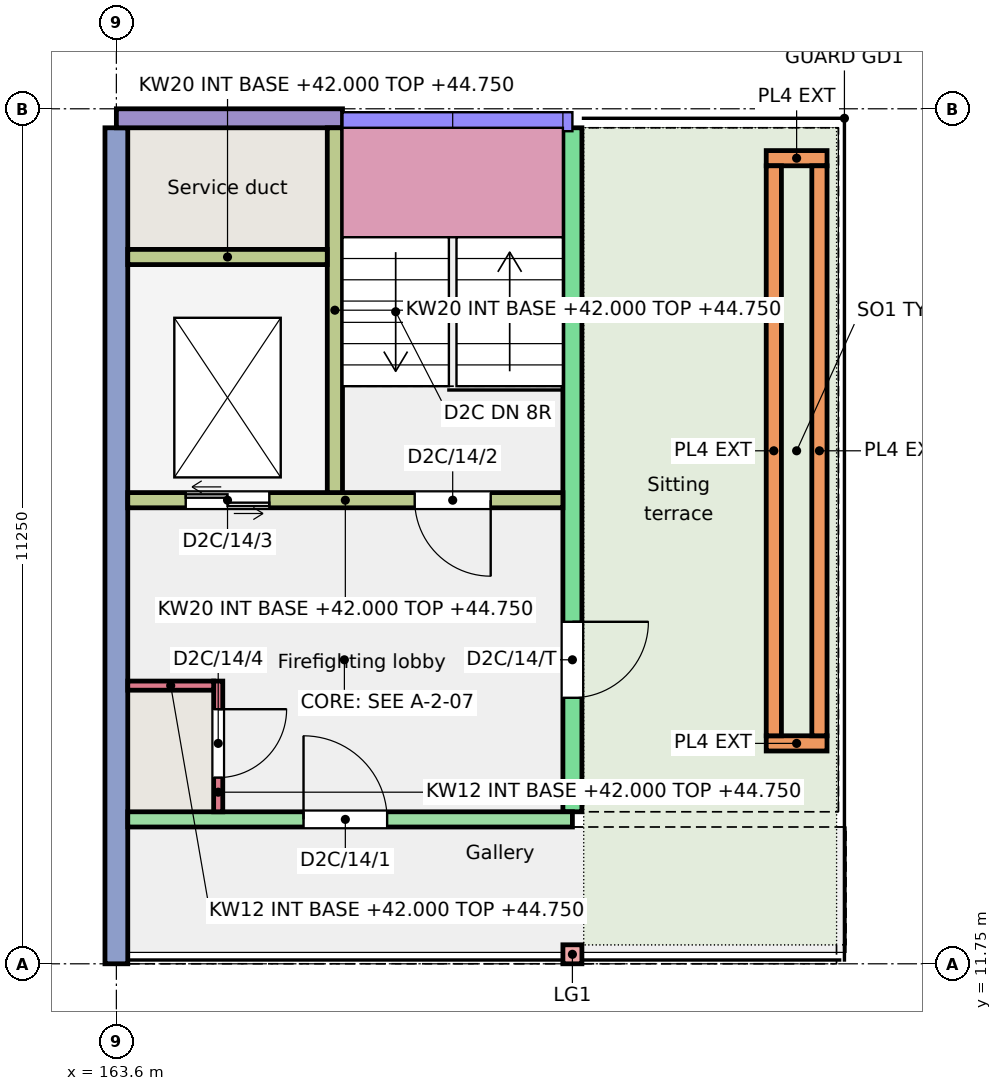
"""IFC4 building model, lengths in metres.
Left out: names, types, materials, properties, quantities, classifications, styles, units other than length and angle.
Written with IfcOpenShell. Run it as: python <this file> out.ifc"""

import sys

from ifc_helpers import new_model, si_unit, direction, frame, frame_2d, origin, origin_2d, place, context, subcontext, project, spatial, rectangle, extrude, element, fill, save


model = new_model("IFC4")
c1 = context("Model", 3, precision=1e-05, world=origin(), true_north=direction((0.0, 1.0)))
c2 = subcontext(c1, "Body", "Model", "MODEL_VIEW")
j1 = project(units=[si_unit("LENGTHUNIT", "METRE"), si_unit("PLANEANGLEUNIT", "RADIAN")], contexts=[c1])
p1 = place(None, origin())
s1 = spatial("IfcSite", under=j1, at=p1, CompositionType="ELEMENT")
p2 = place(p1, origin())
s2 = spatial("IfcBuilding", under=s1, at=p2, CompositionType="ELEMENT")
p3 = place(p2, frame((0.0, 0.0, 42.0)))
s3 = spatial("IfcBuildingStorey", under=s2, at=p3, CompositionType="ELEMENT", Elevation=42.0)
p4 = place(p3, frame((163.6, 11.75, 0.0), z_axis=(0.0, 0.0, 1.0), x_axis=(0.0, 1.0, 0.0)))
e1 = element("IfcWall", 1, at=p4, inside=s3, PredefinedType="SHEAR", context=c2, shape_type="SweptSolid", body=[
    extrude(rectangle(XDim=11.0, YDim=0.3, at=frame_2d((5.5, 0.0))), origin(), (0.0, 0.0, 1.0), 3.0),
])
p5 = place(p3, frame((169.6, 13.75, 0.0), z_axis=(0.0, 0.0, 1.0), x_axis=(0.0, 1.0, 0.0)))
e2 = element("IfcWall", 2, at=p5, inside=s3, PredefinedType="SHEAR", context=c2, shape_type="SweptSolid", body=[
    extrude(rectangle(XDim=9.0, YDim=0.25, at=frame_2d((4.5, 0.0))), origin(), (0.0, 0.0, 1.0), 3.0),
])
p6 = place(p5, frame((1.5, 0.0, 0.0)))
e3 = element("IfcOpeningElement", 3, at=p6, cuts=e2, PredefinedType="OPENING", context=c2, shape_type="SweptSolid", body=[
    extrude(rectangle(XDim=1.0, YDim=2.1, at=frame_2d((0.5, 1.05))), frame((0.0, 0.135, 0.0), z_axis=(0.0, -1.0, 0.0), x_axis=(1.0, 0.0, 0.0)), (0.0, 0.0, 1.0), 0.27),
])
p7 = place(p3, frame((163.6, 22.875, 0.0), z_axis=(0.0, 0.0, 1.0), x_axis=(1.0, 0.0, 0.0)))
e4 = element("IfcWall", 4, at=p7, inside=s3, PredefinedType="SOLIDWALL", context=c2, shape_type="SweptSolid", body=[
    extrude(rectangle(XDim=2.975, YDim=0.25, at=frame_2d((1.487, 0.0))), origin(), (0.0, 0.0, 1.0), 3.0),
])
p8 = place(p3, frame((163.75, 13.65, 0.0), z_axis=(0.0, 0.0, 1.0), x_axis=(1.0, 0.0, 0.0)))
e5 = element("IfcWall", 5, at=p8, inside=s3, PredefinedType="SHEAR", context=c2, shape_type="SweptSolid", body=[
    extrude(rectangle(XDim=5.85, YDim=0.2, at=frame_2d((2.925, 0.0))), origin(), (0.0, 0.0, 1.0), 2.75),
])
p9 = place(p8, frame((2.312, 0.0, 0.0)))
e6 = element("IfcOpeningElement", 6, at=p9, cuts=e5, PredefinedType="OPENING", context=c2, shape_type="SweptSolid", body=[
    extrude(rectangle(XDim=1.1, YDim=2.1, at=frame_2d((0.55, 1.05))), frame((0.0, 0.11, 0.0), z_axis=(0.0, -1.0, 0.0), x_axis=(1.0, 0.0, 0.0)), (0.0, 0.0, 1.0), 0.22),
])
p10 = place(p3, frame((163.75, 17.85, 0.0), z_axis=(0.0, 0.0, 1.0), x_axis=(1.0, 0.0, 0.0)))
e7 = element("IfcWall", 7, at=p10, inside=s3, PredefinedType="SHEAR", context=c2, shape_type="SweptSolid", body=[
    extrude(rectangle(XDim=5.725, YDim=0.2, at=frame_2d((2.863, 0.0))), origin(), (0.0, 0.0, 1.0), 2.75),
])
p11 = place(p10, frame((3.775, 0.0, 0.0)))
e8 = element("IfcOpeningElement", 8, at=p11, cuts=e7, PredefinedType="OPENING", context=c2, shape_type="SweptSolid", body=[
    extrude(rectangle(XDim=1.0, YDim=2.1, at=frame_2d((0.5, 1.05))), frame((0.0, 0.11, 0.0), z_axis=(0.0, -1.0, 0.0), x_axis=(1.0, 0.0, 0.0)), (0.0, 0.0, 1.0), 0.22),
])
p12 = place(p10, frame((0.762, 0.0, 0.0)))
e9 = element("IfcOpeningElement", 9, at=p12, cuts=e7, PredefinedType="OPENING", context=c2, shape_type="SweptSolid", body=[
    extrude(rectangle(XDim=1.1, YDim=2.1, at=frame_2d((0.55, 1.05))), frame((0.0, 0.11, 0.0), z_axis=(0.0, -1.0, 0.0), x_axis=(1.0, 0.0, 0.0)), (0.0, 0.0, 1.0), 0.22),
])
p13 = place(p3, frame((166.475, 17.95, 0.0), z_axis=(0.0, 0.0, 1.0), x_axis=(0.0, 1.0, 0.0)))
e10 = element("IfcWall", 10, at=p13, inside=s3, PredefinedType="SHEAR", context=c2, shape_type="SweptSolid", body=[
    extrude(rectangle(XDim=4.8, YDim=0.2, at=frame_2d((2.4, 0.0))), origin(), (0.0, 0.0, 1.0), 2.75),
])
p14 = place(p3, frame((163.75, 21.05, 0.0), z_axis=(0.0, 0.0, 1.0), x_axis=(1.0, 0.0, 0.0)))
e11 = element("IfcWall", 11, at=p14, inside=s3, PredefinedType="SHEAR", context=c2, shape_type="SweptSolid", body=[
    extrude(rectangle(XDim=2.625, YDim=0.2, at=frame_2d((1.312, 0.0))), origin(), (0.0, 0.0, 1.0), 2.75),
])
p15 = place(p3, frame((164.94, 13.75, 0.0), z_axis=(0.0, 0.0, 1.0), x_axis=(0.0, 1.0, 0.0)))
e12 = element("IfcWall", 12, at=p15, inside=s3, PredefinedType="SHEAR", context=c2, shape_type="SweptSolid", body=[
    extrude(rectangle(XDim=1.72, YDim=0.12, at=frame_2d((0.86, 0.0))), origin(), (0.0, 0.0, 1.0), 2.75),
])
p16 = place(p15, frame((0.45, 0.0, 0.0)))
e13 = element("IfcOpeningElement", 13, at=p16, cuts=e12, PredefinedType="OPENING", context=c2, shape_type="SweptSolid", body=[
    extrude(rectangle(XDim=0.9, YDim=2.1, at=frame_2d((0.45, 1.05))), frame((0.0, 0.07, 0.0), z_axis=(0.0, -1.0, 0.0), x_axis=(1.0, 0.0, 0.0)), (0.0, 0.0, 1.0), 0.14),
])
p17 = place(p3, frame((163.75, 15.41, 0.0), z_axis=(0.0, 0.0, 1.0), x_axis=(1.0, 0.0, 0.0)))
e14 = element("IfcWall", 14, at=p17, inside=s3, PredefinedType="SHEAR", context=c2, shape_type="SweptSolid", body=[
    extrude(rectangle(XDim=1.13, YDim=0.12, at=frame_2d((0.565, 0.0))), origin(), (0.0, 0.0, 1.0), 2.75),
])
p18 = place(p3, frame((169.6, 11.875, 0.0), z_axis=(0.0, 0.0, 1.0), x_axis=(1.0, 0.0, 0.0)))
e15 = element("IfcColumn", 15, at=p18, inside=s3, PredefinedType="COLUMN", context=c2, shape_type="SweptSolid", body=[
    extrude(rectangle(XDim=0.25, YDim=0.25, at=origin_2d()), origin(), (0.0, 0.0, 1.0), 3.0),
])
for number, where, z_axis, x_axis in (
    (16, (172.15, 14.65, 0.01), (0.0, 0.0, 1.0), (1.0, 0.0, 0.0)),
    (17, (172.15, 22.35, 0.01), (0.0, 0.0, 1.0), (1.0, 0.0, 0.0)),
):
    element("IfcWall", number, at=place(p3, frame(where, z_axis=z_axis, x_axis=x_axis)), inside=s3, PredefinedType="SOLIDWALL", context=c2, shape_type="SweptSolid", body=[
        extrude(rectangle(XDim=0.8, YDim=0.2, at=frame_2d((0.4, 0.0))), origin(), (0.0, 0.0, 1.0), 0.45),
    ])
for number, where, z_axis, x_axis in (
    (18, (172.25, 14.75, 0.01), (0.0, 0.0, 1.0), (0.0, 1.0, 0.0)),
    (19, (172.85, 14.75, 0.01), (0.0, 0.0, 1.0), (0.0, 1.0, 0.0)),
):
    element("IfcWall", number, at=place(p3, frame(where, z_axis=z_axis, x_axis=x_axis)), inside=s3, PredefinedType="SOLIDWALL", context=c2, shape_type="SweptSolid", body=[
        extrude(rectangle(XDim=7.5, YDim=0.2, at=frame_2d((3.75, 0.0))), origin(), (0.0, 0.0, 1.0), 0.45),
    ])
p19 = place(p9, origin())
e20 = element("IfcDoor", 20, at=p19, inside=s3, OperationType="SINGLE_SWING_LEFT", PredefinedType="DOOR", context=c2, shape_type="SweptSolid", body=[
    extrude(rectangle(XDim=1.1, YDim=2.1, at=frame_2d((0.55, 1.05))), frame((0.0, 0.025, 0.0), z_axis=(0.0, -1.0, 0.0), x_axis=(1.0, 0.0, 0.0)), (0.0, 0.0, 1.0), 0.05),
])
fill(e6, e20)
p20 = place(p11, origin())
e21 = element("IfcDoor", 21, at=p20, inside=s3, OperationType="SINGLE_SWING_RIGHT", PredefinedType="DOOR", context=c2, shape_type="SweptSolid", body=[
    extrude(rectangle(XDim=1.0, YDim=2.1, at=frame_2d((0.5, 1.05))), frame((0.0, 0.025, 0.0), z_axis=(0.0, -1.0, 0.0), x_axis=(1.0, 0.0, 0.0)), (0.0, 0.0, 1.0), 0.05),
])
fill(e8, e21)
p21 = place(p12, origin())
e22 = element("IfcDoor", 22, at=p21, inside=s3, OperationType="DOUBLE_DOOR_SLIDING", PredefinedType="DOOR", context=c2, shape_type="SweptSolid", body=[
    extrude(rectangle(XDim=1.1, YDim=2.1, at=frame_2d((0.55, 1.05))), frame((0.0, 0.025, 0.0), z_axis=(0.0, -1.0, 0.0), x_axis=(1.0, 0.0, 0.0)), (0.0, 0.0, 1.0), 0.05),
])
fill(e9, e22)
p22 = place(p16, origin())
e23 = element("IfcDoor", 23, at=p22, inside=s3, OperationType="SINGLE_SWING_RIGHT", PredefinedType="DOOR", context=c2, shape_type="SweptSolid", body=[
    extrude(rectangle(XDim=0.9, YDim=2.1, at=frame_2d((0.45, 1.05))), frame((0.0, 0.025, 0.0), z_axis=(0.0, -1.0, 0.0), x_axis=(1.0, 0.0, 0.0)), (0.0, 0.0, 1.0), 0.05),
])
fill(e13, e23)
p23 = place(p6, origin())
e24 = element("IfcDoor", 24, at=p23, inside=s3, OperationType="SINGLE_SWING_RIGHT", PredefinedType="DOOR", context=c2, shape_type="SweptSolid", body=[
    extrude(rectangle(XDim=1.0, YDim=2.1, at=frame_2d((0.5, 1.05))), frame((0.0, 0.025, 0.0), z_axis=(0.0, -1.0, 0.0), x_axis=(1.0, 0.0, 0.0)), (0.0, 0.0, 1.0), 0.05),
])
fill(e3, e24)
save(model, sys.argv[1])
